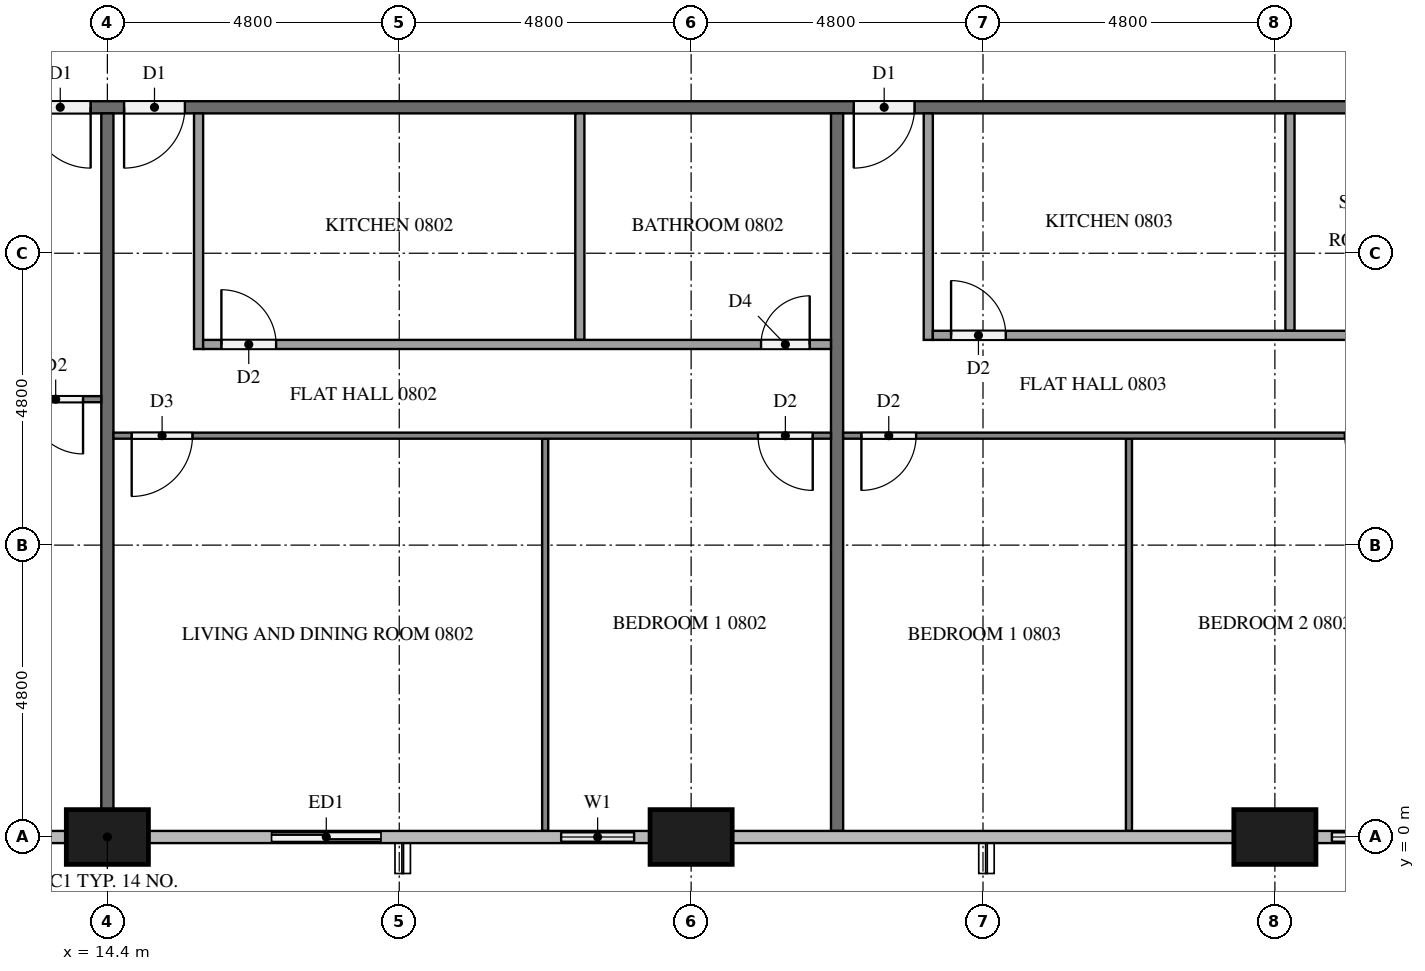
"""IFC4 building model, lengths in metres.
Left out: names, types, materials, properties, quantities, classifications, styles, units other than length and angle.
Written with IfcOpenShell. Run it as: python <this file> out.ifc"""

import sys

from ifc_helpers import new_model, si_unit, direction, frame, frame_2d, origin, origin_2d, place, context, subcontext, project, spatial, rectangle, extrude, element, fill, save


model = new_model("IFC4")
c1 = context("Model", 3, precision=1e-05, world=origin(), true_north=direction((0.0, 1.0)))
c2 = subcontext(c1, "Body", "Model", "MODEL_VIEW")
j1 = project(units=[si_unit("LENGTHUNIT", "METRE"), si_unit("PLANEANGLEUNIT", "RADIAN")], contexts=[c1])
p1 = place(None, origin())
s1 = spatial("IfcSite", under=j1, at=p1, CompositionType="ELEMENT")
p2 = place(p1, origin())
s2 = spatial("IfcBuilding", under=s1, at=p2, CompositionType="ELEMENT")
p3 = place(p2, frame((0.0, 0.0, 36.4)))
s3 = spatial("IfcBuildingStorey", under=s2, at=p3, CompositionType="ELEMENT", Elevation=36.4)
for number, where, z_axis, x_axis in (
    (1, (14.4, 0.0, 0.0), (0.0, 0.0, 1.0), (1.0, 0.0, 0.0)),
    (2, (24.0, 0.0, 0.0), (0.0, 0.0, 1.0), (1.0, 0.0, 0.0)),
    (3, (33.6, 0.0, 0.0), (0.0, 0.0, 1.0), (1.0, 0.0, 0.0)),
):
    element("IfcColumn", number, at=place(p3, frame(where, z_axis=z_axis, x_axis=x_axis)), inside=s3, PredefinedType="COLUMN", context=c2, shape_type="SweptSolid", body=[
        extrude(rectangle(XDim=1.35, YDim=0.9, at=origin_2d()), origin(), (0.0, 0.0, 1.0), 3.2),
    ])
p4 = place(p3, frame((12.0, 0.0, 0.0), z_axis=(0.0, 0.0, 1.0), x_axis=(1.0, 0.0, 0.0)))
e4 = element("IfcWall", 4, at=p4, inside=s3, PredefinedType="SOLIDWALL", context=c2, shape_type="SweptSolid", body=[
    extrude(rectangle(XDim=1.725, YDim=0.15, at=frame_2d((0.863, 0.0))), origin(), (0.0, 0.0, 1.0), 3.2),
])
p5 = place(p4, frame((0.262, 0.0, 0.9)))
e5 = element("IfcOpeningElement", 5, at=p5, cuts=e4, PredefinedType="OPENING", context=c2, shape_type="SweptSolid", body=[
    extrude(rectangle(XDim=1.2, YDim=1.4, at=frame_2d((0.6, 0.7))), frame((0.0, 0.085, 0.0), z_axis=(0.0, -1.0, 0.0), x_axis=(1.0, 0.0, 0.0)), (0.0, 0.0, 1.0), 0.17),
])
p6 = place(p3, frame((16.8, 0.0, 0.0), z_axis=(0.0, 0.0, 1.0), x_axis=(1.0, 0.0, 0.0)))
e6 = element("IfcWall", 6, at=p6, inside=s3, PredefinedType="SOLIDWALL", context=c2, shape_type="SweptSolid", body=[
    extrude(rectangle(XDim=2.4, YDim=0.15, at=frame_2d((1.2, 0.0))), origin(), (0.0, 0.0, 1.0), 3.2),
])
p7 = place(p6, frame((0.3, 0.0, 0.0)))
e7 = element("IfcOpeningElement", 7, at=p7, cuts=e6, PredefinedType="OPENING", context=c2, shape_type="SweptSolid", body=[
    extrude(rectangle(XDim=1.8, YDim=2.4, at=frame_2d((0.9, 1.2))), frame((0.0, 0.085, 0.0), z_axis=(0.0, -1.0, 0.0), x_axis=(1.0, 0.0, 0.0)), (0.0, 0.0, 1.0), 0.17),
])
p8 = place(p3, frame((21.6, 0.0, 0.0), z_axis=(0.0, 0.0, 1.0), x_axis=(1.0, 0.0, 0.0)))
e8 = element("IfcWall", 8, at=p8, inside=s3, PredefinedType="SOLIDWALL", context=c2, shape_type="SweptSolid", body=[
    extrude(rectangle(XDim=1.725, YDim=0.15, at=frame_2d((0.862, 0.0))), origin(), (0.0, 0.0, 1.0), 3.2),
])
p9 = place(p8, frame((0.262, 0.0, 0.9)))
e9 = element("IfcOpeningElement", 9, at=p9, cuts=e8, PredefinedType="OPENING", context=c2, shape_type="SweptSolid", body=[
    extrude(rectangle(XDim=1.2, YDim=1.4, at=frame_2d((0.6, 0.7))), frame((0.0, 0.085, 0.0), z_axis=(0.0, -1.0, 0.0), x_axis=(1.0, 0.0, 0.0)), (0.0, 0.0, 1.0), 0.17),
])
p10 = place(p3, frame((34.275, 0.0, 0.0), z_axis=(0.0, 0.0, 1.0), x_axis=(1.0, 0.0, 0.0)))
e10 = element("IfcWall", 10, at=p10, inside=s3, PredefinedType="SOLIDWALL", context=c2, shape_type="SweptSolid", body=[
    extrude(rectangle(XDim=4.125, YDim=0.15, at=frame_2d((2.062, 0.0))), origin(), (0.0, 0.0, 1.0), 3.2),
])
p11 = place(p10, frame((0.262, 0.0, 0.9)))
e11 = element("IfcOpeningElement", 11, at=p11, cuts=e10, PredefinedType="OPENING", context=c2, shape_type="SweptSolid", body=[
    extrude(rectangle(XDim=1.2, YDim=1.4, at=frame_2d((0.6, 0.7))), frame((0.0, 0.085, 0.0), z_axis=(0.0, -1.0, 0.0), x_axis=(1.0, 0.0, 0.0)), (0.0, 0.0, 1.0), 0.17),
])
p12 = place(p10, frame((2.025, 0.0, 0.0)))
e12 = element("IfcOpeningElement", 12, at=p12, cuts=e10, PredefinedType="OPENING", context=c2, shape_type="SweptSolid", body=[
    extrude(rectangle(XDim=1.8, YDim=2.4, at=frame_2d((0.9, 1.2))), frame((0.0, 0.085, 0.0), z_axis=(0.0, -1.0, 0.0), x_axis=(1.0, 0.0, 0.0)), (0.0, 0.0, 1.0), 0.17),
])
p13 = place(p3, frame((50.5, 12.0, 0.0), z_axis=(0.0, 0.0, 1.0), x_axis=(-1.0, 0.0, 0.0)))
e13 = element("IfcWall", 13, at=p13, inside=s3, PredefinedType="PARTITIONING", context=c2, shape_type="SweptSolid", body=[
    extrude(rectangle(XDim=38.6, YDim=0.2, at=frame_2d((19.3, 0.0))), origin(), (0.0, 0.0, 1.0), 3.2),
])
p14 = place(p13, frame((36.375, 0.0, 0.0)))
e14 = element("IfcOpeningElement", 14, at=p14, cuts=e13, PredefinedType="OPENING", context=c2, shape_type="SweptSolid", body=[
    extrude(rectangle(XDim=1.0, YDim=2.1, at=frame_2d((0.5, 1.05))), frame((0.0, 0.11, 0.0), z_axis=(0.0, -1.0, 0.0), x_axis=(1.0, 0.0, 0.0)), (0.0, 0.0, 1.0), 0.22),
])
p15 = place(p13, frame((34.825, 0.0, 0.0)))
e15 = element("IfcOpeningElement", 15, at=p15, cuts=e13, PredefinedType="OPENING", context=c2, shape_type="SweptSolid", body=[
    extrude(rectangle(XDim=1.0, YDim=2.1, at=frame_2d((0.5, 1.05))), frame((0.0, 0.11, 0.0), z_axis=(0.0, -1.0, 0.0), x_axis=(1.0, 0.0, 0.0)), (0.0, 0.0, 1.0), 0.22),
])
p16 = place(p13, frame((22.825, 0.0, 0.0)))
e16 = element("IfcOpeningElement", 16, at=p16, cuts=e13, PredefinedType="OPENING", context=c2, shape_type="SweptSolid", body=[
    extrude(rectangle(XDim=1.0, YDim=2.1, at=frame_2d((0.5, 1.05))), frame((0.0, 0.11, 0.0), z_axis=(0.0, -1.0, 0.0), x_axis=(1.0, 0.0, 0.0)), (0.0, 0.0, 1.0), 0.22),
])
p17 = place(p13, frame((8.425, 0.0, 0.0)))
e17 = element("IfcOpeningElement", 17, at=p17, cuts=e13, PredefinedType="OPENING", context=c2, shape_type="SweptSolid", body=[
    extrude(rectangle(XDim=1.0, YDim=2.1, at=frame_2d((0.5, 1.05))), frame((0.0, 0.11, 0.0), z_axis=(0.0, -1.0, 0.0), x_axis=(1.0, 0.0, 0.0)), (0.0, 0.0, 1.0), 0.22),
])
p18 = place(p13, frame((1.225, 0.0, 0.0)))
e18 = element("IfcOpeningElement", 18, at=p18, cuts=e13, PredefinedType="OPENING", context=c2, shape_type="SweptSolid", body=[
    extrude(rectangle(XDim=1.0, YDim=2.1, at=frame_2d((0.5, 1.05))), frame((0.0, 0.11, 0.0), z_axis=(0.0, -1.0, 0.0), x_axis=(1.0, 0.0, 0.0)), (0.0, 0.0, 1.0), 0.22),
])
p19 = place(p3, frame((14.4, 11.9, 0.0), z_axis=(0.0, 0.0, 1.0), x_axis=(0.0, -1.0, 0.0)))
e19 = element("IfcWall", 19, at=p19, inside=s3, PredefinedType="PARTITIONING", context=c2, shape_type="SweptSolid", body=[
    extrude(rectangle(XDim=11.45, YDim=0.2, at=frame_2d((5.725, 0.0))), origin(), (0.0, 0.0, 1.0), 3.2),
])
p20 = place(p3, frame((26.4, 11.9, 0.0), z_axis=(0.0, 0.0, 1.0), x_axis=(0.0, -1.0, 0.0)))
e20 = element("IfcWall", 20, at=p20, inside=s3, PredefinedType="PARTITIONING", context=c2, shape_type="SweptSolid", body=[
    extrude(rectangle(XDim=11.8, YDim=0.2, at=frame_2d((5.9, 0.0))), origin(), (0.0, 0.0, 1.0), 3.2),
])
p21 = place(p3, frame((14.3, 7.2, 0.0), z_axis=(0.0, 0.0, 1.0), x_axis=(-1.0, 0.0, 0.0)))
e21 = element("IfcWall", 21, at=p21, inside=s3, PredefinedType="PARTITIONING", context=c2, shape_type="SweptSolid", body=[
    extrude(rectangle(XDim=14.2, YDim=0.1, at=frame_2d((7.1, 0.0))), origin(), (0.0, 0.0, 1.0), 3.2),
])
p22 = place(p21, frame((0.3, 0.0, 0.0)))
e22 = element("IfcOpeningElement", 22, at=p22, cuts=e21, PredefinedType="OPENING", context=c2, shape_type="SweptSolid", body=[
    extrude(rectangle(XDim=0.9, YDim=2.1, at=frame_2d((0.45, 1.05))), frame((0.0, 0.06, 0.0), z_axis=(0.0, -1.0, 0.0), x_axis=(1.0, 0.0, 0.0)), (0.0, 0.0, 1.0), 0.12),
])
p23 = place(p21, frame((8.25, 0.0, 0.0)))
e23 = element("IfcOpeningElement", 23, at=p23, cuts=e21, PredefinedType="OPENING", context=c2, shape_type="SweptSolid", body=[
    extrude(rectangle(XDim=0.9, YDim=2.1, at=frame_2d((0.45, 1.05))), frame((0.0, 0.06, 0.0), z_axis=(0.0, -1.0, 0.0), x_axis=(1.0, 0.0, 0.0)), (0.0, 0.0, 1.0), 0.12),
])
p24 = place(p21, frame((9.85, 0.0, 0.0)))
e24 = element("IfcOpeningElement", 24, at=p24, cuts=e21, PredefinedType="OPENING", context=c2, shape_type="SweptSolid", body=[
    extrude(rectangle(XDim=1.0, YDim=2.1, at=frame_2d((0.5, 1.05))), frame((0.0, 0.06, 0.0), z_axis=(0.0, -1.0, 0.0), x_axis=(1.0, 0.0, 0.0)), (0.0, 0.0, 1.0), 0.12),
])
p25 = place(p3, frame((21.6, 6.55, 0.0), z_axis=(0.0, 0.0, 1.0), x_axis=(0.0, -1.0, 0.0)))
e25 = element("IfcWall", 25, at=p25, inside=s3, PredefinedType="PARTITIONING", context=c2, shape_type="SweptSolid", body=[
    extrude(rectangle(XDim=6.45, YDim=0.1, at=frame_2d((3.225, 0.0))), origin(), (0.0, 0.0, 1.0), 3.2),
])
p26 = place(p3, frame((26.3, 6.6, 0.0), z_axis=(0.0, 0.0, 1.0), x_axis=(-1.0, 0.0, 0.0)))
e26 = element("IfcWall", 26, at=p26, inside=s3, PredefinedType="PARTITIONING", context=c2, shape_type="SweptSolid", body=[
    extrude(rectangle(XDim=11.8, YDim=0.1, at=frame_2d((5.9, 0.0))), origin(), (0.0, 0.0, 1.0), 3.2),
])
p27 = place(p26, frame((10.5, 0.0, 0.0)))
e27 = element("IfcOpeningElement", 27, at=p27, cuts=e26, PredefinedType="OPENING", context=c2, shape_type="SweptSolid", body=[
    extrude(rectangle(XDim=1.0, YDim=2.1, at=frame_2d((0.5, 1.05))), frame((0.0, 0.06, 0.0), z_axis=(0.0, -1.0, 0.0), x_axis=(1.0, 0.0, 0.0)), (0.0, 0.0, 1.0), 0.12),
])
p28 = place(p26, frame((0.3, 0.0, 0.0)))
e28 = element("IfcOpeningElement", 28, at=p28, cuts=e26, PredefinedType="OPENING", context=c2, shape_type="SweptSolid", body=[
    extrude(rectangle(XDim=0.9, YDim=2.1, at=frame_2d((0.45, 1.05))), frame((0.0, 0.06, 0.0), z_axis=(0.0, -1.0, 0.0), x_axis=(1.0, 0.0, 0.0)), (0.0, 0.0, 1.0), 0.12),
])
p29 = place(p3, frame((22.17, 11.9, 0.0), z_axis=(0.0, 0.0, 1.0), x_axis=(0.0, -1.0, 0.0)))
e29 = element("IfcWall", 29, at=p29, inside=s3, PredefinedType="PARTITIONING", context=c2, shape_type="SweptSolid", body=[
    extrude(rectangle(XDim=3.725, YDim=0.15, at=frame_2d((1.862, 0.0))), origin(), (0.0, 0.0, 1.0), 3.2),
])
p30 = place(p3, frame((15.9, 11.9, 0.0), z_axis=(0.0, 0.0, 1.0), x_axis=(0.0, -1.0, 0.0)))
e30 = element("IfcWall", 30, at=p30, inside=s3, PredefinedType="PARTITIONING", context=c2, shape_type="SweptSolid", body=[
    extrude(rectangle(XDim=3.875, YDim=0.15, at=frame_2d((1.938, 0.0))), origin(), (0.0, 0.0, 1.0), 3.2),
])
p31 = place(p3, frame((15.975, 8.1, 0.0), z_axis=(0.0, 0.0, 1.0), x_axis=(1.0, 0.0, 0.0)))
e31 = element("IfcWall", 31, at=p31, inside=s3, PredefinedType="PARTITIONING", context=c2, shape_type="SweptSolid", body=[
    extrude(rectangle(XDim=10.325, YDim=0.15, at=frame_2d((5.163, 0.0))), origin(), (0.0, 0.0, 1.0), 3.2),
])
p32 = place(p31, frame((0.3, 0.0, 0.0)))
e32 = element("IfcOpeningElement", 32, at=p32, cuts=e31, PredefinedType="OPENING", context=c2, shape_type="SweptSolid", body=[
    extrude(rectangle(XDim=0.9, YDim=2.1, at=frame_2d((0.45, 1.05))), frame((0.0, 0.085, 0.0), z_axis=(0.0, -1.0, 0.0), x_axis=(1.0, 0.0, 0.0)), (0.0, 0.0, 1.0), 0.17),
])
p33 = place(p31, frame((9.175, 0.0, 0.0)))
e33 = element("IfcOpeningElement", 33, at=p33, cuts=e31, PredefinedType="OPENING", context=c2, shape_type="SweptSolid", body=[
    extrude(rectangle(XDim=0.8, YDim=2.1, at=frame_2d((0.4, 1.05))), frame((0.0, 0.085, 0.0), z_axis=(0.0, -1.0, 0.0), x_axis=(1.0, 0.0, 0.0)), (0.0, 0.0, 1.0), 0.17),
])
p34 = place(p3, frame((31.2, 6.55, 0.0), z_axis=(0.0, 0.0, 1.0), x_axis=(0.0, -1.0, 0.0)))
e34 = element("IfcWall", 34, at=p34, inside=s3, PredefinedType="PARTITIONING", context=c2, shape_type="SweptSolid", body=[
    extrude(rectangle(XDim=6.45, YDim=0.1, at=frame_2d((3.225, 0.0))), origin(), (0.0, 0.0, 1.0), 3.2),
])
p35 = place(p3, frame((40.7, 6.6, 0.0), z_axis=(0.0, 0.0, 1.0), x_axis=(-1.0, 0.0, 0.0)))
e35 = element("IfcWall", 35, at=p35, inside=s3, PredefinedType="PARTITIONING", context=c2, shape_type="SweptSolid", body=[
    extrude(rectangle(XDim=14.2, YDim=0.1, at=frame_2d((7.1, 0.0))), origin(), (0.0, 0.0, 1.0), 3.2),
])
p36 = place(p35, frame((13.0, 0.0, 0.0)))
e36 = element("IfcOpeningElement", 36, at=p36, cuts=e35, PredefinedType="OPENING", context=c2, shape_type="SweptSolid", body=[
    extrude(rectangle(XDim=0.9, YDim=2.1, at=frame_2d((0.45, 1.05))), frame((0.0, 0.06, 0.0), z_axis=(0.0, -1.0, 0.0), x_axis=(1.0, 0.0, 0.0)), (0.0, 0.0, 1.0), 0.12),
])
p37 = place(p35, frame((5.05, 0.0, 0.0)))
e37 = element("IfcOpeningElement", 37, at=p37, cuts=e35, PredefinedType="OPENING", context=c2, shape_type="SweptSolid", body=[
    extrude(rectangle(XDim=0.9, YDim=2.1, at=frame_2d((0.45, 1.05))), frame((0.0, 0.06, 0.0), z_axis=(0.0, -1.0, 0.0), x_axis=(1.0, 0.0, 0.0)), (0.0, 0.0, 1.0), 0.12),
])
p38 = place(p35, frame((3.35, 0.0, 0.0)))
e38 = element("IfcOpeningElement", 38, at=p38, cuts=e35, PredefinedType="OPENING", context=c2, shape_type="SweptSolid", body=[
    extrude(rectangle(XDim=1.0, YDim=2.1, at=frame_2d((0.5, 1.05))), frame((0.0, 0.06, 0.0), z_axis=(0.0, -1.0, 0.0), x_axis=(1.0, 0.0, 0.0)), (0.0, 0.0, 1.0), 0.12),
])
p39 = place(p3, frame((33.848, 11.9, 0.0), z_axis=(0.0, 0.0, 1.0), x_axis=(0.0, -1.0, 0.0)))
e39 = element("IfcWall", 39, at=p39, inside=s3, PredefinedType="PARTITIONING", context=c2, shape_type="SweptSolid", body=[
    extrude(rectangle(XDim=3.575, YDim=0.15, at=frame_2d((1.788, 0.0))), origin(), (0.0, 0.0, 1.0), 3.2),
])
p40 = place(p3, frame((27.9, 11.9, 0.0), z_axis=(0.0, 0.0, 1.0), x_axis=(0.0, -1.0, 0.0)))
e40 = element("IfcWall", 40, at=p40, inside=s3, PredefinedType="PARTITIONING", context=c2, shape_type="SweptSolid", body=[
    extrude(rectangle(XDim=3.725, YDim=0.15, at=frame_2d((1.862, 0.0))), origin(), (0.0, 0.0, 1.0), 3.2),
])
p41 = place(p3, frame((27.975, 8.25, 0.0), z_axis=(0.0, 0.0, 1.0), x_axis=(1.0, 0.0, 0.0)))
e41 = element("IfcWall", 41, at=p41, inside=s3, PredefinedType="PARTITIONING", context=c2, shape_type="SweptSolid", body=[
    extrude(rectangle(XDim=12.725, YDim=0.15, at=frame_2d((6.362, 0.0))), origin(), (0.0, 0.0, 1.0), 3.2),
])
p42 = place(p41, frame((0.3, 0.0, 0.0)))
e42 = element("IfcOpeningElement", 42, at=p42, cuts=e41, PredefinedType="OPENING", context=c2, shape_type="SweptSolid", body=[
    extrude(rectangle(XDim=0.9, YDim=2.1, at=frame_2d((0.45, 1.05))), frame((0.0, 0.085, 0.0), z_axis=(0.0, -1.0, 0.0), x_axis=(1.0, 0.0, 0.0)), (0.0, 0.0, 1.0), 0.17),
])
p43 = place(p41, frame((7.685, 0.0, 0.0)))
e43 = element("IfcOpeningElement", 43, at=p43, cuts=e41, PredefinedType="OPENING", context=c2, shape_type="SweptSolid", body=[
    extrude(rectangle(XDim=0.8, YDim=2.1, at=frame_2d((0.4, 1.05))), frame((0.0, 0.085, 0.0), z_axis=(0.0, -1.0, 0.0), x_axis=(1.0, 0.0, 0.0)), (0.0, 0.0, 1.0), 0.17),
])
p44 = place(p41, frame((9.135, 0.0, 0.0)))
e44 = element("IfcOpeningElement", 44, at=p44, cuts=e41, PredefinedType="OPENING", context=c2, shape_type="SweptSolid", body=[
    extrude(rectangle(XDim=0.9, YDim=2.1, at=frame_2d((0.45, 1.05))), frame((0.0, 0.085, 0.0), z_axis=(0.0, -1.0, 0.0), x_axis=(1.0, 0.0, 0.0)), (0.0, 0.0, 1.0), 0.17),
])
p45 = place(p7, origin())
e45 = element("IfcDoor", 45, at=p45, inside=s3, OperationType="SLIDING_TO_LEFT", PredefinedType="DOOR", context=c2, shape_type="SweptSolid", body=[
    extrude(rectangle(XDim=1.8, YDim=2.4, at=frame_2d((0.9, 1.2))), frame((0.0, 0.025, 0.0), z_axis=(0.0, -1.0, 0.0), x_axis=(1.0, 0.0, 0.0)), (0.0, 0.0, 1.0), 0.05),
])
fill(e7, e45)
p46 = place(p9, origin())
e46 = element("IfcWindow", 46, at=p46, inside=s3, PartitioningType="SINGLE_PANEL", PredefinedType="WINDOW", context=c2, shape_type="SweptSolid", body=[
    extrude(rectangle(XDim=1.2, YDim=1.4, at=frame_2d((0.6, 0.7))), frame((0.0, 0.03, 0.0), z_axis=(0.0, -1.0, 0.0), x_axis=(1.0, 0.0, 0.0)), (0.0, 0.0, 1.0), 0.06),
])
fill(e9, e46)
p47 = place(p11, origin())
e47 = element("IfcWindow", 47, at=p47, inside=s3, PartitioningType="SINGLE_PANEL", PredefinedType="WINDOW", context=c2, shape_type="SweptSolid", body=[
    extrude(rectangle(XDim=1.2, YDim=1.4, at=frame_2d((0.6, 0.7))), frame((0.0, 0.03, 0.0), z_axis=(0.0, -1.0, 0.0), x_axis=(1.0, 0.0, 0.0)), (0.0, 0.0, 1.0), 0.06),
])
fill(e11, e47)
p48 = place(p14, origin())
e48 = element("IfcDoor", 48, at=p48, inside=s3, OperationType="SINGLE_SWING_LEFT", PredefinedType="DOOR", context=c2, shape_type="SweptSolid", body=[
    extrude(rectangle(XDim=1.0, YDim=2.1, at=frame_2d((0.5, 1.05))), frame((0.0, 0.025, 0.0), z_axis=(0.0, -1.0, 0.0), x_axis=(1.0, 0.0, 0.0)), (0.0, 0.0, 1.0), 0.05),
])
fill(e14, e48)
p49 = place(p15, origin())
e49 = element("IfcDoor", 49, at=p49, inside=s3, OperationType="SINGLE_SWING_RIGHT", PredefinedType="DOOR", context=c2, shape_type="SweptSolid", body=[
    extrude(rectangle(XDim=1.0, YDim=2.1, at=frame_2d((0.5, 1.05))), frame((0.0, 0.025, 0.0), z_axis=(0.0, -1.0, 0.0), x_axis=(1.0, 0.0, 0.0)), (0.0, 0.0, 1.0), 0.05),
])
fill(e15, e49)
p50 = place(p16, origin())
e50 = element("IfcDoor", 50, at=p50, inside=s3, OperationType="SINGLE_SWING_RIGHT", PredefinedType="DOOR", context=c2, shape_type="SweptSolid", body=[
    extrude(rectangle(XDim=1.0, YDim=2.1, at=frame_2d((0.5, 1.05))), frame((0.0, 0.025, 0.0), z_axis=(0.0, -1.0, 0.0), x_axis=(1.0, 0.0, 0.0)), (0.0, 0.0, 1.0), 0.05),
])
fill(e16, e50)
p51 = place(p22, origin())
e51 = element("IfcDoor", 51, at=p51, inside=s3, OperationType="SINGLE_SWING_LEFT", PredefinedType="DOOR", context=c2, shape_type="SweptSolid", body=[
    extrude(rectangle(XDim=0.9, YDim=2.1, at=frame_2d((0.45, 1.05))), frame((0.0, 0.025, 0.0), z_axis=(0.0, -1.0, 0.0), x_axis=(1.0, 0.0, 0.0)), (0.0, 0.0, 1.0), 0.05),
])
fill(e22, e51)
p52 = place(p27, origin())
e52 = element("IfcDoor", 52, at=p52, inside=s3, OperationType="SINGLE_SWING_RIGHT", PredefinedType="DOOR", context=c2, shape_type="SweptSolid", body=[
    extrude(rectangle(XDim=1.0, YDim=2.1, at=frame_2d((0.5, 1.05))), frame((0.0, 0.025, 0.0), z_axis=(0.0, -1.0, 0.0), x_axis=(1.0, 0.0, 0.0)), (0.0, 0.0, 1.0), 0.05),
])
fill(e27, e52)
p53 = place(p28, origin())
e53 = element("IfcDoor", 53, at=p53, inside=s3, OperationType="SINGLE_SWING_LEFT", PredefinedType="DOOR", context=c2, shape_type="SweptSolid", body=[
    extrude(rectangle(XDim=0.9, YDim=2.1, at=frame_2d((0.45, 1.05))), frame((0.0, 0.025, 0.0), z_axis=(0.0, -1.0, 0.0), x_axis=(1.0, 0.0, 0.0)), (0.0, 0.0, 1.0), 0.05),
])
fill(e28, e53)
p54 = place(p32, origin())
e54 = element("IfcDoor", 54, at=p54, inside=s3, OperationType="SINGLE_SWING_LEFT", PredefinedType="DOOR", context=c2, shape_type="SweptSolid", body=[
    extrude(rectangle(XDim=0.9, YDim=2.1, at=frame_2d((0.45, 1.05))), frame((0.0, 0.025, 0.0), z_axis=(0.0, -1.0, 0.0), x_axis=(1.0, 0.0, 0.0)), (0.0, 0.0, 1.0), 0.05),
])
fill(e32, e54)
p55 = place(p33, origin())
e55 = element("IfcDoor", 55, at=p55, inside=s3, OperationType="SINGLE_SWING_RIGHT", PredefinedType="DOOR", context=c2, shape_type="SweptSolid", body=[
    extrude(rectangle(XDim=0.8, YDim=2.1, at=frame_2d((0.4, 1.05))), frame((0.0, 0.025, 0.0), z_axis=(0.0, -1.0, 0.0), x_axis=(1.0, 0.0, 0.0)), (0.0, 0.0, 1.0), 0.05),
])
fill(e33, e55)
p56 = place(p36, origin())
e56 = element("IfcDoor", 56, at=p56, inside=s3, OperationType="SINGLE_SWING_RIGHT", PredefinedType="DOOR", context=c2, shape_type="SweptSolid", body=[
    extrude(rectangle(XDim=0.9, YDim=2.1, at=frame_2d((0.45, 1.05))), frame((0.0, 0.025, 0.0), z_axis=(0.0, -1.0, 0.0), x_axis=(1.0, 0.0, 0.0)), (0.0, 0.0, 1.0), 0.05),
])
fill(e36, e56)
p57 = place(p37, origin())
e57 = element("IfcDoor", 57, at=p57, inside=s3, OperationType="SINGLE_SWING_LEFT", PredefinedType="DOOR", context=c2, shape_type="SweptSolid", body=[
    extrude(rectangle(XDim=0.9, YDim=2.1, at=frame_2d((0.45, 1.05))), frame((0.0, 0.025, 0.0), z_axis=(0.0, -1.0, 0.0), x_axis=(1.0, 0.0, 0.0)), (0.0, 0.0, 1.0), 0.05),
])
fill(e37, e57)
p58 = place(p42, origin())
e58 = element("IfcDoor", 58, at=p58, inside=s3, OperationType="SINGLE_SWING_LEFT", PredefinedType="DOOR", context=c2, shape_type="SweptSolid", body=[
    extrude(rectangle(XDim=0.9, YDim=2.1, at=frame_2d((0.45, 1.05))), frame((0.0, 0.025, 0.0), z_axis=(0.0, -1.0, 0.0), x_axis=(1.0, 0.0, 0.0)), (0.0, 0.0, 1.0), 0.05),
])
fill(e42, e58)
save(model, sys.argv[1])
